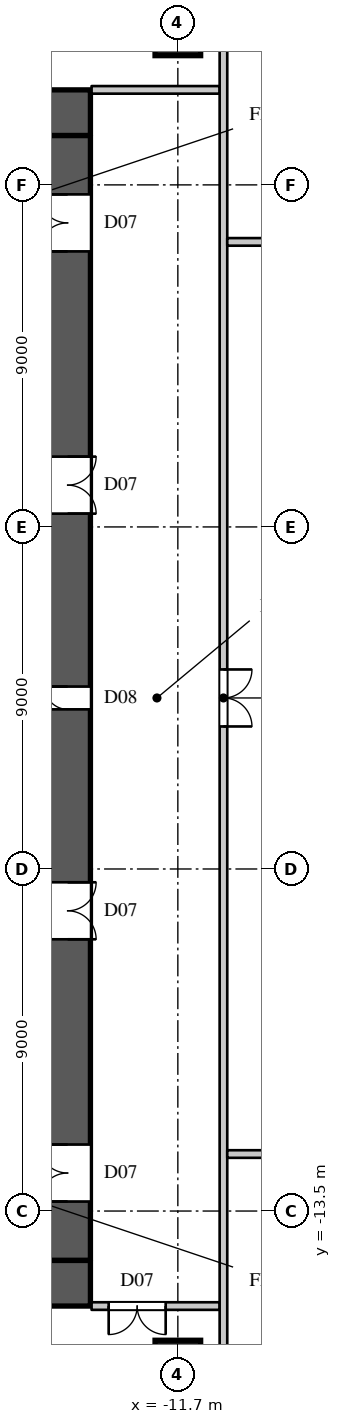
"""IFC4 building model, lengths in metres.
Left out: names, types, materials, properties, quantities, classifications, styles, units other than length and angle.
Written with IfcOpenShell. Run it as: python <this file> out.ifc"""

import sys

from ifc_helpers import new_model, si_unit, direction, frame, frame_2d, origin, origin_2d, place, context, subcontext, project, spatial, rectangle, circle, extrude, element, fill, save


model = new_model("IFC4")
c1 = context("Model", 3, precision=1e-05, world=origin(), true_north=direction((0.0, 1.0)))
c2 = subcontext(c1, "Body", "Model", "MODEL_VIEW")
j1 = project(units=[si_unit("LENGTHUNIT", "METRE"), si_unit("PLANEANGLEUNIT", "RADIAN")], contexts=[c1])
p1 = place(None, origin())
s1 = spatial("IfcSite", under=j1, at=p1, CompositionType="ELEMENT")
p2 = place(p1, origin())
s2 = spatial("IfcBuilding", under=s1, at=p2, CompositionType="ELEMENT")
p3 = place(p2, frame((0.0, 0.0, 44.0)))
s3 = spatial("IfcBuildingStorey", under=s2, at=p3, CompositionType="ELEMENT", Elevation=44.0)
for number, where, z_axis, x_axis in (
    (1, (-11.7, -17.5, 0.0), (0.0, 0.0, 1.0), (1.0, 0.0, 0.0)),
    (2, (-11.7, 17.5, 0.0), (0.0, 0.0, 1.0), (1.0, 0.0, 0.0)),
):
    element("IfcColumn", number, at=place(p3, frame(where, z_axis=z_axis, x_axis=x_axis)), inside=s3, PredefinedType="COLUMN", context=c2, shape_type="SweptSolid", body=[
        extrude(circle(Radius=0.6, at=origin_2d()), origin(), (0.0, 0.0, 1.0), 6.0),
    ])
for number, where, z_axis, x_axis in (
    (3, (-30.0, 15.4, 0.0), (0.0, 0.0, 1.0), (1.0, 0.0, 0.0)),
    (4, (-30.0, -15.4, 0.0), (0.0, 0.0, 1.0), (1.0, 0.0, 0.0)),
):
    element("IfcWall", number, at=place(p3, frame(where, z_axis=z_axis, x_axis=x_axis)), inside=s3, PredefinedType="SHEAR", context=c2, shape_type="SweptSolid", body=[
        extrude(rectangle(XDim=16.0, YDim=1.2, at=frame_2d((8.0, 0.0))), origin(), (0.0, 0.0, 1.0), 6.0),
    ])
p4 = place(p3, frame((-14.6, -14.8, 0.0), z_axis=(0.0, 0.0, 1.0), x_axis=(0.0, 1.0, 0.0)))
e5 = element("IfcWall", 5, at=p4, inside=s3, PredefinedType="SHEAR", context=c2, shape_type="SweptSolid", body=[
    extrude(rectangle(XDim=29.6, YDim=1.2, at=frame_2d((14.8, 0.0))), origin(), (0.0, 0.0, 1.0), 6.0),
])
p5 = place(p4, frame((1.55, 0.0, 0.0)))
e6 = element("IfcOpeningElement", 6, at=p5, cuts=e5, PredefinedType="OPENING", context=c2, shape_type="SweptSolid", body=[
    extrude(rectangle(XDim=1.5, YDim=2.4, at=frame_2d((0.75, 1.2))), frame((0.0, 0.61, 0.0), z_axis=(0.0, -1.0, 0.0), x_axis=(1.0, 0.0, 0.0)), (0.0, 0.0, 1.0), 1.22),
])
p6 = place(p4, frame((26.55, 0.0, 0.0)))
e7 = element("IfcOpeningElement", 7, at=p6, cuts=e5, PredefinedType="OPENING", context=c2, shape_type="SweptSolid", body=[
    extrude(rectangle(XDim=1.5, YDim=2.4, at=frame_2d((0.75, 1.2))), frame((0.0, 0.61, 0.0), z_axis=(0.0, -1.0, 0.0), x_axis=(1.0, 0.0, 0.0)), (0.0, 0.0, 1.0), 1.22),
])
p7 = place(p4, frame((8.45, 0.0, 0.0)))
e8 = element("IfcOpeningElement", 8, at=p7, cuts=e5, PredefinedType="OPENING", context=c2, shape_type="SweptSolid", body=[
    extrude(rectangle(XDim=1.5, YDim=2.4, at=frame_2d((0.75, 1.2))), frame((0.0, 0.61, 0.0), z_axis=(0.0, -1.0, 0.0), x_axis=(1.0, 0.0, 0.0)), (0.0, 0.0, 1.0), 1.22),
])
p8 = place(p4, frame((19.65, 0.0, 0.0)))
e9 = element("IfcOpeningElement", 9, at=p8, cuts=e5, PredefinedType="OPENING", context=c2, shape_type="SweptSolid", body=[
    extrude(rectangle(XDim=1.5, YDim=2.4, at=frame_2d((0.75, 1.2))), frame((0.0, 0.61, 0.0), z_axis=(0.0, -1.0, 0.0), x_axis=(1.0, 0.0, 0.0)), (0.0, 0.0, 1.0), 1.22),
])
p9 = place(p4, frame((14.5, 0.0, 0.0)))
e10 = element("IfcOpeningElement", 10, at=p9, cuts=e5, PredefinedType="OPENING", context=c2, shape_type="SweptSolid", body=[
    extrude(rectangle(XDim=0.6, YDim=2.0, at=frame_2d((0.3, 1.0))), frame((0.0, 0.61, 0.0), z_axis=(0.0, -1.0, 0.0), x_axis=(1.0, 0.0, 0.0)), (0.0, 0.0, 1.0), 1.22),
])
p10 = place(p3, frame((-13.97, -16.0, 0.0), z_axis=(0.0, 0.0, 1.0), x_axis=(1.0, 0.0, 0.0)))
e11 = element("IfcWall", 11, at=p10, inside=s3, PredefinedType="PARTITIONING", context=c2, shape_type="SweptSolid", body=[
    extrude(rectangle(XDim=3.37, YDim=0.2, at=frame_2d((1.685, 0.0))), origin(), (0.0, 0.0, 1.0), 5.596),
])
p11 = place(p10, frame((0.45, 0.0, 0.0)))
e12 = element("IfcOpeningElement", 12, at=p11, cuts=e11, PredefinedType="OPENING", context=c2, shape_type="SweptSolid", body=[
    extrude(rectangle(XDim=1.5, YDim=2.4, at=frame_2d((0.75, 1.2))), frame((0.0, 0.11, 0.0), z_axis=(0.0, -1.0, 0.0), x_axis=(1.0, 0.0, 0.0)), (0.0, 0.0, 1.0), 0.22),
])
p12 = place(p3, frame((-13.97, 16.0, 0.0), z_axis=(0.0, 0.0, 1.0), x_axis=(1.0, 0.0, 0.0)))
e13 = element("IfcWall", 13, at=p12, inside=s3, PredefinedType="PARTITIONING", context=c2, shape_type="SweptSolid", body=[
    extrude(rectangle(XDim=3.37, YDim=0.2, at=frame_2d((1.685, 0.0))), origin(), (0.0, 0.0, 1.0), 5.596),
])
p13 = place(p3, frame((-10.5, -19.4, 0.0), z_axis=(0.0, 0.0, 1.0), x_axis=(0.0, 1.0, 0.0)))
e14 = element("IfcWall", 14, at=p13, inside=s3, PredefinedType="PARTITIONING", context=c2, shape_type="SweptSolid", body=[
    extrude(rectangle(XDim=38.8, YDim=0.2, at=frame_2d((19.4, 0.0))), origin(), (0.0, 0.0, 1.0), 5.596),
])
p14 = place(p13, frame((18.65, 0.0, 0.0)))
e15 = element("IfcOpeningElement", 15, at=p14, cuts=e14, PredefinedType="OPENING", context=c2, shape_type="SweptSolid", body=[
    extrude(rectangle(XDim=1.5, YDim=2.4, at=frame_2d((0.75, 1.2))), frame((0.0, 0.11, 0.0), z_axis=(0.0, -1.0, 0.0), x_axis=(1.0, 0.0, 0.0)), (0.0, 0.0, 1.0), 0.22),
])
p15 = place(p3, frame((-10.4, -12.0, 0.0), z_axis=(0.0, 0.0, 1.0), x_axis=(1.0, 0.0, 0.0)))
e16 = element("IfcWall", 16, at=p15, inside=s3, PredefinedType="PARTITIONING", context=c2, shape_type="SweptSolid", body=[
    extrude(rectangle(XDim=24.8, YDim=0.2, at=frame_2d((12.4, 0.0))), origin(), (0.0, 0.0, 1.0), 5.596),
])
p16 = place(p15, frame((3.3, 0.0, 0.0)))
e17 = element("IfcOpeningElement", 17, at=p16, cuts=e16, PredefinedType="OPENING", context=c2, shape_type="SweptSolid", body=[
    extrude(rectangle(XDim=0.95, YDim=2.2, at=frame_2d((0.475, 1.1))), frame((0.0, 0.11, 0.0), z_axis=(0.0, -1.0, 0.0), x_axis=(1.0, 0.0, 0.0)), (0.0, 0.0, 1.0), 0.22),
])
p17 = place(p15, frame((11.4, 0.0, 0.0)))
e18 = element("IfcOpeningElement", 18, at=p17, cuts=e16, PredefinedType="OPENING", context=c2, shape_type="SweptSolid", body=[
    extrude(rectangle(XDim=0.95, YDim=2.2, at=frame_2d((0.475, 1.1))), frame((0.0, 0.11, 0.0), z_axis=(0.0, -1.0, 0.0), x_axis=(1.0, 0.0, 0.0)), (0.0, 0.0, 1.0), 0.22),
])
p18 = place(p15, frame((20.05, 0.0, 0.0)))
e19 = element("IfcOpeningElement", 19, at=p18, cuts=e16, PredefinedType="OPENING", context=c2, shape_type="SweptSolid", body=[
    extrude(rectangle(XDim=0.95, YDim=2.2, at=frame_2d((0.475, 1.1))), frame((0.0, 0.11, 0.0), z_axis=(0.0, -1.0, 0.0), x_axis=(1.0, 0.0, 0.0)), (0.0, 0.0, 1.0), 0.22),
])
p19 = place(p3, frame((-10.4, 12.0, 0.0), z_axis=(0.0, 0.0, 1.0), x_axis=(1.0, 0.0, 0.0)))
e20 = element("IfcWall", 20, at=p19, inside=s3, PredefinedType="PARTITIONING", context=c2, shape_type="SweptSolid", body=[
    extrude(rectangle(XDim=24.8, YDim=0.2, at=frame_2d((12.4, 0.0))), origin(), (0.0, 0.0, 1.0), 5.596),
])
p20 = place(p19, frame((5.75, 0.0, 0.0)))
e21 = element("IfcOpeningElement", 21, at=p20, cuts=e20, PredefinedType="OPENING", context=c2, shape_type="SweptSolid", body=[
    extrude(rectangle(XDim=0.95, YDim=2.2, at=frame_2d((0.475, 1.1))), frame((0.0, 0.11, 0.0), z_axis=(0.0, -1.0, 0.0), x_axis=(1.0, 0.0, 0.0)), (0.0, 0.0, 1.0), 0.22),
])
p21 = place(p19, frame((18.05, 0.0, 0.0)))
e22 = element("IfcOpeningElement", 22, at=p21, cuts=e20, PredefinedType="OPENING", context=c2, shape_type="SweptSolid", body=[
    extrude(rectangle(XDim=0.95, YDim=2.2, at=frame_2d((0.475, 1.1))), frame((0.0, 0.11, 0.0), z_axis=(0.0, -1.0, 0.0), x_axis=(1.0, 0.0, 0.0)), (0.0, 0.0, 1.0), 0.22),
])
p22 = place(p11, origin())
e23 = element("IfcDoor", 23, at=p22, inside=s3, OperationType="DOUBLE_DOOR_SINGLE_SWING", PredefinedType="DOOR", context=c2, shape_type="SweptSolid", body=[
    extrude(rectangle(XDim=1.5, YDim=2.4, at=frame_2d((0.75, 1.2))), frame((0.0, 0.025, 0.0), z_axis=(0.0, -1.0, 0.0), x_axis=(1.0, 0.0, 0.0)), (0.0, 0.0, 1.0), 0.05),
])
fill(e12, e23)
p23 = place(p14, origin())
e24 = element("IfcDoor", 24, at=p23, inside=s3, OperationType="DOUBLE_DOOR_SINGLE_SWING", PredefinedType="DOOR", context=c2, shape_type="SweptSolid", body=[
    extrude(rectangle(XDim=1.5, YDim=2.4, at=frame_2d((0.75, 1.2))), frame((0.0, 0.025, 0.0), z_axis=(0.0, -1.0, 0.0), x_axis=(1.0, 0.0, 0.0)), (0.0, 0.0, 1.0), 0.05),
])
fill(e15, e24)
p24 = place(p5, origin())
e25 = element("IfcDoor", 25, at=p24, inside=s3, OperationType="DOUBLE_DOOR_SINGLE_SWING", PredefinedType="DOOR", context=c2, shape_type="SweptSolid", body=[
    extrude(rectangle(XDim=1.5, YDim=2.4, at=frame_2d((0.75, 1.2))), frame((0.0, 0.025, 0.0), z_axis=(0.0, -1.0, 0.0), x_axis=(1.0, 0.0, 0.0)), (0.0, 0.0, 1.0), 0.05),
])
fill(e6, e25)
p25 = place(p6, origin())
e26 = element("IfcDoor", 26, at=p25, inside=s3, OperationType="DOUBLE_DOOR_SINGLE_SWING", PredefinedType="DOOR", context=c2, shape_type="SweptSolid", body=[
    extrude(rectangle(XDim=1.5, YDim=2.4, at=frame_2d((0.75, 1.2))), frame((0.0, 0.025, 0.0), z_axis=(0.0, -1.0, 0.0), x_axis=(1.0, 0.0, 0.0)), (0.0, 0.0, 1.0), 0.05),
])
fill(e7, e26)
p26 = place(p7, origin())
e27 = element("IfcDoor", 27, at=p26, inside=s3, OperationType="DOUBLE_DOOR_SINGLE_SWING", PredefinedType="DOOR", context=c2, shape_type="SweptSolid", body=[
    extrude(rectangle(XDim=1.5, YDim=2.4, at=frame_2d((0.75, 1.2))), frame((0.0, 0.025, 0.0), z_axis=(0.0, -1.0, 0.0), x_axis=(1.0, 0.0, 0.0)), (0.0, 0.0, 1.0), 0.05),
])
fill(e8, e27)
p27 = place(p8, origin())
e28 = element("IfcDoor", 28, at=p27, inside=s3, OperationType="DOUBLE_DOOR_SINGLE_SWING", PredefinedType="DOOR", context=c2, shape_type="SweptSolid", body=[
    extrude(rectangle(XDim=1.5, YDim=2.4, at=frame_2d((0.75, 1.2))), frame((0.0, 0.025, 0.0), z_axis=(0.0, -1.0, 0.0), x_axis=(1.0, 0.0, 0.0)), (0.0, 0.0, 1.0), 0.05),
])
fill(e9, e28)
p28 = place(p9, origin())
e29 = element("IfcDoor", 29, at=p28, inside=s3, OperationType="SINGLE_SWING_RIGHT", PredefinedType="DOOR", context=c2, shape_type="SweptSolid", body=[
    extrude(rectangle(XDim=0.6, YDim=2.0, at=frame_2d((0.3, 1.0))), frame((0.0, 0.025, 0.0), z_axis=(0.0, -1.0, 0.0), x_axis=(1.0, 0.0, 0.0)), (0.0, 0.0, 1.0), 0.05),
])
fill(e10, e29)
save(model, sys.argv[1])
